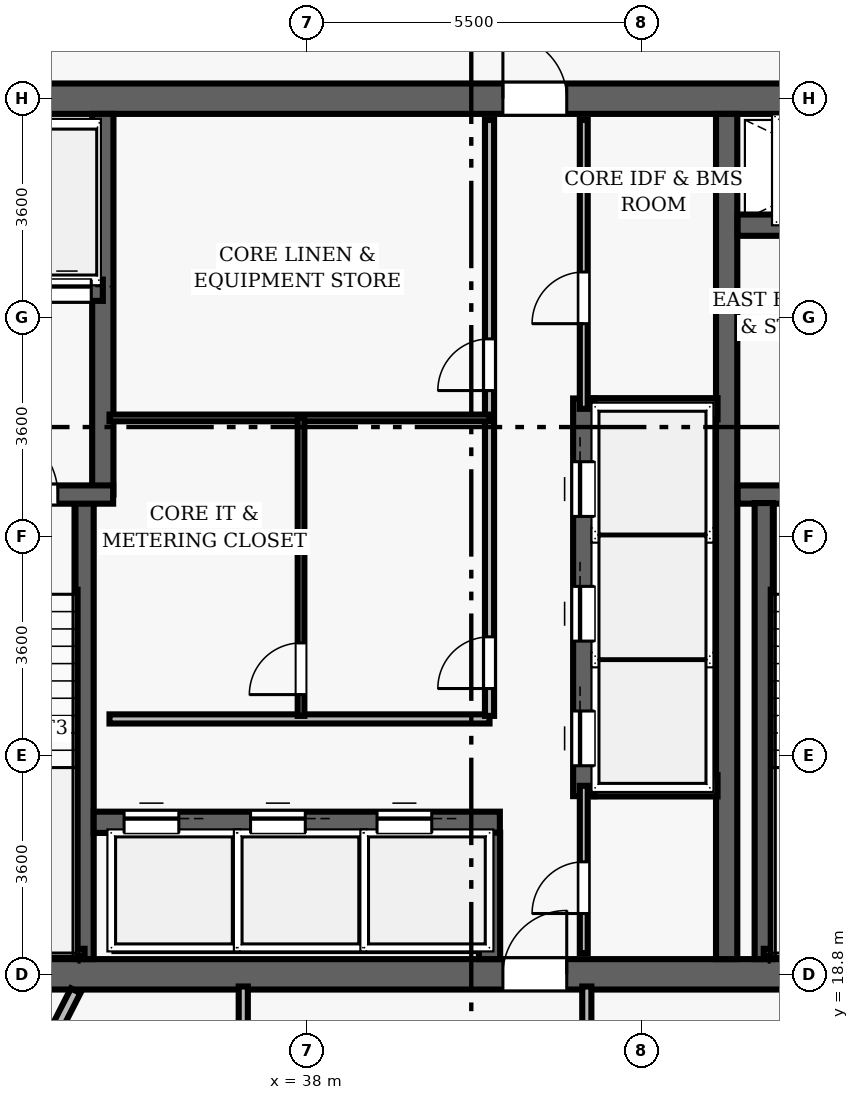
"""IFC4 building model, lengths in metres.
Left out: names, types, materials, properties, quantities, classifications, styles, units other than length and angle.
Written with IfcOpenShell. Run it as: python <this file> out.ifc"""

import sys

from ifc_helpers import new_model, si_unit, direction, frame, frame_2d, origin, place, context, subcontext, project, spatial, rectangle, extrude, element, fill, save


model = new_model("IFC4")
c1 = context("Model", 3, precision=1e-05, world=origin(), true_north=direction((0.0, 1.0)))
c2 = subcontext(c1, "Body", "Model", "MODEL_VIEW")
j1 = project(units=[si_unit("LENGTHUNIT", "METRE"), si_unit("PLANEANGLEUNIT", "RADIAN")], contexts=[c1])
p1 = place(None, origin())
s1 = spatial("IfcSite", under=j1, at=p1, CompositionType="ELEMENT")
p2 = place(p1, origin())
s2 = spatial("IfcBuilding", under=s1, at=p2, CompositionType="ELEMENT")
p3 = place(p2, frame((0.0, 0.0, 171.2)))
s3 = spatial("IfcBuildingStorey", under=s2, at=p3, CompositionType="ELEMENT", Elevation=171.2)
p4 = place(p3, frame((26.75, 18.8, 0.0), z_axis=(0.0, 0.0, 1.0), x_axis=(1.0, 0.0, 0.0)))
e1 = element("IfcWall", 1, at=p4, inside=s3, PredefinedType="SHEAR", context=c2, shape_type="SweptSolid", body=[
    extrude(rectangle(XDim=22.5, YDim=0.5, at=frame_2d((11.25, 0.0))), origin(), (0.0, 0.0, 1.0), 3.85),
])
p5 = place(p4, frame((14.47, 0.0, 0.0)))
e2 = element("IfcOpeningElement", 2, at=p5, cuts=e1, PredefinedType="OPENING", context=c2, shape_type="SweptSolid", body=[
    extrude(rectangle(XDim=1.05, YDim=2.15, at=frame_2d((0.525, 1.075))), frame((0.0, 0.26, 0.0), z_axis=(0.0, -1.0, 0.0), x_axis=(1.0, 0.0, 0.0)), (0.0, 0.0, 1.0), 0.52),
])
p6 = place(p3, frame((26.75, 33.2, 0.0), z_axis=(0.0, 0.0, 1.0), x_axis=(1.0, 0.0, 0.0)))
e3 = element("IfcWall", 3, at=p6, inside=s3, PredefinedType="SHEAR", context=c2, shape_type="SweptSolid", body=[
    extrude(rectangle(XDim=22.5, YDim=0.5, at=frame_2d((11.25, 0.0))), origin(), (0.0, 0.0, 1.0), 3.85),
])
p7 = place(p6, frame((4.57, 0.0, 0.0)))
e4 = element("IfcOpeningElement", 4, at=p7, cuts=e3, PredefinedType="OPENING", context=c2, shape_type="SweptSolid", body=[
    extrude(rectangle(XDim=1.05, YDim=2.15, at=frame_2d((0.525, 1.075))), frame((0.0, 0.26, 0.0), z_axis=(0.0, -1.0, 0.0), x_axis=(1.0, 0.0, 0.0)), (0.0, 0.0, 1.0), 0.52),
])
p8 = place(p6, frame((14.47, 0.0, 0.0)))
e5 = element("IfcOpeningElement", 5, at=p8, cuts=e3, PredefinedType="OPENING", context=c2, shape_type="SweptSolid", body=[
    extrude(rectangle(XDim=1.05, YDim=2.15, at=frame_2d((0.525, 1.075))), frame((0.0, 0.26, 0.0), z_axis=(0.0, -1.0, 0.0), x_axis=(1.0, 0.0, 0.0)), (0.0, 0.0, 1.0), 0.52),
])
p9 = place(p3, frame((44.9, 19.05, 0.0), z_axis=(0.0, 0.0, 1.0), x_axis=(0.0, 1.0, 0.0)))
e6 = element("IfcWall", 6, at=p9, inside=s3, PredefinedType="SHEAR", context=c2, shape_type="SweptSolid", body=[
    extrude(rectangle(XDim=13.9, YDim=0.35, at=frame_2d((6.95, 0.0))), origin(), (0.0, 0.0, 1.0), 3.85),
])
p10 = place(p3, frame((45.08, 26.69, 0.0), z_axis=(0.0, 0.0, 1.0), x_axis=(1.0, 0.0, 0.0)))
e7 = element("IfcWall", 7, at=p10, inside=s3, PredefinedType="SHEAR", context=c2, shape_type="SweptSolid", body=[
    extrude(rectangle(XDim=3.67, YDim=0.3, at=frame_2d((1.835, 0.0))), origin(), (0.0, 0.0, 1.0), 3.85),
])
p11 = place(p10, frame((1.05, 0.0, 0.0)))
e8 = element("IfcOpeningElement", 8, at=p11, cuts=e7, PredefinedType="OPENING", context=c2, shape_type="SweptSolid", body=[
    extrude(rectangle(XDim=1.1, YDim=2.15, at=frame_2d((0.55, 1.075))), frame((0.0, 0.16, 0.0), z_axis=(0.0, -1.0, 0.0), x_axis=(1.0, 0.0, 0.0)), (0.0, 0.0, 1.0), 0.32),
])
p12 = place(p3, frame((45.51, 19.05, 0.0), z_axis=(0.0, 0.0, 1.0), x_axis=(0.0, 1.0, 0.0)))
e9 = element("IfcWall", 9, at=p12, inside=s3, PredefinedType="SHEAR", context=c2, shape_type="SweptSolid", body=[
    extrude(rectangle(XDim=7.5, YDim=0.3, at=frame_2d((3.75, 0.0))), origin(), (0.0, 0.0, 1.0), 3.85),
])
p13 = place(p3, frame((45.51, 19.16, 0.0), z_axis=(0.0, 0.0, 1.0), x_axis=(1.0, 0.0, 0.0)))
e10 = element("IfcWall", 10, at=p13, inside=s3, PredefinedType="SHEAR", context=c2, shape_type="SweptSolid", body=[
    extrude(rectangle(XDim=3.095, YDim=0.12, at=frame_2d((1.547, 0.0))), origin(), (0.0, 0.0, 1.0), 3.85),
])
p14 = place(p3, frame((45.08, 31.12, 0.0), z_axis=(0.0, 0.0, 1.0), x_axis=(1.0, 0.0, 0.0)))
e11 = element("IfcWall", 11, at=p14, inside=s3, PredefinedType="SHEAR", context=c2, shape_type="SweptSolid", body=[
    extrude(rectangle(XDim=3.67, YDim=0.35, at=frame_2d((1.835, 0.0))), origin(), (0.0, 0.0, 1.0), 3.035),
])
p15 = place(p14, frame((1.25, 0.0, 0.0)))
e12 = element("IfcOpeningElement", 12, at=p15, cuts=e11, PredefinedType="OPENING", context=c2, shape_type="SweptSolid", body=[
    extrude(rectangle(XDim=1.1, YDim=2.15, at=frame_2d((0.55, 1.075))), frame((0.0, 0.185, 0.0), z_axis=(0.0, -1.0, 0.0), x_axis=(1.0, 0.0, 0.0)), (0.0, 0.0, 1.0), 0.37),
])
p16 = place(p3, frame((34.34, 19.05, 0.0), z_axis=(0.0, 0.0, 1.0), x_axis=(0.0, 1.0, 0.0)))
e13 = element("IfcWall", 13, at=p16, inside=s3, PredefinedType="SHEAR", context=c2, shape_type="SweptSolid", body=[
    extrude(rectangle(XDim=7.5, YDim=0.3, at=frame_2d((3.75, 0.0))), origin(), (0.0, 0.0, 1.0), 3.85),
])
p17 = place(p3, frame((34.64, 26.69, 0.0), z_axis=(0.0, 0.0, 1.0), x_axis=(0.0, 1.0, 0.0)))
e14 = element("IfcWall", 14, at=p17, inside=s3, PredefinedType="SHEAR", context=c2, shape_type="SweptSolid", body=[
    extrude(rectangle(XDim=6.26, YDim=0.35, at=frame_2d((3.13, 0.0))), origin(), (0.0, 0.0, 1.0), 3.85),
])
p18 = place(p3, frame((31.25, 26.69, 0.0), z_axis=(0.0, 0.0, 1.0), x_axis=(1.0, 0.0, 0.0)))
e15 = element("IfcWall", 15, at=p18, inside=s3, PredefinedType="SHEAR", context=c2, shape_type="SweptSolid", body=[
    extrude(rectangle(XDim=3.56, YDim=0.3, at=frame_2d((1.78, 0.0))), origin(), (0.0, 0.0, 1.0), 3.85),
])
p19 = place(p18, frame((1.55, 0.0, 0.0)))
e16 = element("IfcOpeningElement", 16, at=p19, cuts=e15, PredefinedType="OPENING", context=c2, shape_type="SweptSolid", body=[
    extrude(rectangle(XDim=1.1, YDim=2.15, at=frame_2d((0.55, 1.075))), frame((0.0, 0.16, 0.0), z_axis=(0.0, -1.0, 0.0), x_axis=(1.0, 0.0, 0.0)), (0.0, 0.0, 1.0), 0.32),
])
p20 = place(p3, frame((31.3, 19.16, 0.0), z_axis=(0.0, 0.0, 1.0), x_axis=(1.0, 0.0, 0.0)))
e17 = element("IfcWall", 17, at=p20, inside=s3, PredefinedType="SHEAR", context=c2, shape_type="SweptSolid", body=[
    extrude(rectangle(XDim=3.04, YDim=0.12, at=frame_2d((1.52, 0.0))), origin(), (0.0, 0.0, 1.0), 3.85),
])
p21 = place(p3, frame((32.23, 30.05, 0.0), z_axis=(0.0, 0.0, 1.0), x_axis=(1.0, 0.0, 0.0)))
e18 = element("IfcWall", 18, at=p21, inside=s3, PredefinedType="SHEAR", context=c2, shape_type="SweptSolid", body=[
    extrude(rectangle(XDim=2.41, YDim=0.35, at=frame_2d((1.205, 0.0))), origin(), (0.0, 0.0, 1.0), 3.035),
])
p22 = place(p21, frame((0.42, 0.0, 0.0)))
e19 = element("IfcOpeningElement", 19, at=p22, cuts=e18, PredefinedType="OPENING", context=c2, shape_type="SweptSolid", body=[
    extrude(rectangle(XDim=0.8, YDim=2.15, at=frame_2d((0.4, 1.075))), frame((0.0, 0.185, 0.0), z_axis=(0.0, -1.0, 0.0), x_axis=(1.0, 0.0, 0.0)), (0.0, 0.0, 1.0), 0.37),
])
p23 = place(p21, frame((1.42, 0.0, 0.0)))
e20 = element("IfcOpeningElement", 20, at=p23, cuts=e18, PredefinedType="OPENING", context=c2, shape_type="SweptSolid", body=[
    extrude(rectangle(XDim=0.8, YDim=2.15, at=frame_2d((0.4, 1.075))), frame((0.0, 0.185, 0.0), z_axis=(0.0, -1.0, 0.0), x_axis=(1.0, 0.0, 0.0)), (0.0, 0.0, 1.0), 0.37),
])
p24 = place(p3, frame((42.55, 21.73, 0.0), z_axis=(0.0, 0.0, 1.0), x_axis=(0.0, 1.0, 0.0)))
e21 = element("IfcWall", 21, at=p24, inside=s3, PredefinedType="SHEAR", context=c2, shape_type="SweptSolid", body=[
    extrude(rectangle(XDim=6.54, YDim=0.35, at=frame_2d((3.27, 0.0))), origin(), (0.0, 0.0, 1.0), 3.035),
])
p25 = place(p24, frame((0.5, 0.0, 0.0)))
e22 = element("IfcOpeningElement", 22, at=p25, cuts=e21, PredefinedType="OPENING", context=c2, shape_type="SweptSolid", body=[
    extrude(rectangle(XDim=0.9, YDim=2.15, at=frame_2d((0.45, 1.075))), frame((0.0, 0.185, 0.0), z_axis=(0.0, -1.0, 0.0), x_axis=(1.0, 0.0, 0.0)), (0.0, 0.0, 1.0), 0.37),
])
p26 = place(p24, frame((2.55, 0.0, 0.0)))
e23 = element("IfcOpeningElement", 23, at=p26, cuts=e21, PredefinedType="OPENING", context=c2, shape_type="SweptSolid", body=[
    extrude(rectangle(XDim=0.9, YDim=2.15, at=frame_2d((0.45, 1.075))), frame((0.0, 0.185, 0.0), z_axis=(0.0, -1.0, 0.0), x_axis=(1.0, 0.0, 0.0)), (0.0, 0.0, 1.0), 0.37),
])
p27 = place(p24, frame((4.6, 0.0, 0.0)))
e24 = element("IfcOpeningElement", 24, at=p27, cuts=e21, PredefinedType="OPENING", context=c2, shape_type="SweptSolid", body=[
    extrude(rectangle(XDim=0.9, YDim=2.15, at=frame_2d((0.45, 1.075))), frame((0.0, 0.185, 0.0), z_axis=(0.0, -1.0, 0.0), x_axis=(1.0, 0.0, 0.0)), (0.0, 0.0, 1.0), 0.37),
])
for number, where, z_axis, x_axis in (
    (25, (42.72, 21.9, 0.0), (0.0, 0.0, 1.0), (1.0, 0.0, 0.0)),
    (26, (42.72, 28.1, 0.0), (0.0, 0.0, 1.0), (1.0, 0.0, 0.0)),
):
    element("IfcWall", number, at=place(p3, frame(where, z_axis=z_axis, x_axis=x_axis)), inside=s3, PredefinedType="SHEAR", context=c2, shape_type="SweptSolid", body=[
        extrude(rectangle(XDim=2.03, YDim=0.35, at=frame_2d((1.015, 0.0))), origin(), (0.0, 0.0, 1.0), 3.035),
    ])
p28 = place(p3, frame((34.49, 21.3, 0.0), z_axis=(0.0, 0.0, 1.0), x_axis=(1.0, 0.0, 0.0)))
e27 = element("IfcWall", 27, at=p28, inside=s3, PredefinedType="SHEAR", context=c2, shape_type="SweptSolid", body=[
    extrude(rectangle(XDim=6.68, YDim=0.35, at=frame_2d((3.34, 0.0))), origin(), (0.0, 0.0, 1.0), 3.035),
])
p29 = place(p28, frame((0.5, 0.0, 0.0)))
e28 = element("IfcOpeningElement", 28, at=p29, cuts=e27, PredefinedType="OPENING", context=c2, shape_type="SweptSolid", body=[
    extrude(rectangle(XDim=0.9, YDim=2.15, at=frame_2d((0.45, 1.075))), frame((0.0, 0.185, 0.0), z_axis=(0.0, -1.0, 0.0), x_axis=(1.0, 0.0, 0.0)), (0.0, 0.0, 1.0), 0.37),
])
p30 = place(p28, frame((2.58, 0.0, 0.0)))
e29 = element("IfcOpeningElement", 29, at=p30, cuts=e27, PredefinedType="OPENING", context=c2, shape_type="SweptSolid", body=[
    extrude(rectangle(XDim=0.9, YDim=2.15, at=frame_2d((0.45, 1.075))), frame((0.0, 0.185, 0.0), z_axis=(0.0, -1.0, 0.0), x_axis=(1.0, 0.0, 0.0)), (0.0, 0.0, 1.0), 0.37),
])
p31 = place(p28, frame((4.66, 0.0, 0.0)))
e30 = element("IfcOpeningElement", 30, at=p31, cuts=e27, PredefinedType="OPENING", context=c2, shape_type="SweptSolid", body=[
    extrude(rectangle(XDim=0.9, YDim=2.15, at=frame_2d((0.45, 1.075))), frame((0.0, 0.185, 0.0), z_axis=(0.0, -1.0, 0.0), x_axis=(1.0, 0.0, 0.0)), (0.0, 0.0, 1.0), 0.37),
])
p32 = place(p3, frame((41.0, 19.05, 0.0), z_axis=(0.0, 0.0, 1.0), x_axis=(0.0, 1.0, 0.0)))
e31 = element("IfcWall", 31, at=p32, inside=s3, PredefinedType="SHEAR", context=c2, shape_type="SweptSolid", body=[
    extrude(rectangle(XDim=2.08, YDim=0.35, at=frame_2d((1.04, 0.0))), origin(), (0.0, 0.0, 1.0), 3.035),
])
p33 = place(p3, frame((34.75, 23.0, 0.0), z_axis=(0.0, 0.0, 1.0), x_axis=(1.0, 0.0, 0.0)))
e32 = element("IfcWall", 32, at=p33, inside=s3, PredefinedType="PARTITIONING", context=c2, shape_type="SweptSolid", body=[
    extrude(rectangle(XDim=6.25, YDim=0.15, at=frame_2d((3.125, 0.0))), origin(), (0.0, 0.0, 1.0), 3.035),
])
p34 = place(p3, frame((41.0, 23.05, 0.0), z_axis=(0.0, 0.0, 1.0), x_axis=(0.0, 1.0, 0.0)))
e33 = element("IfcWall", 33, at=p34, inside=s3, PredefinedType="PARTITIONING", context=c2, shape_type="SweptSolid", body=[
    extrude(rectangle(XDim=9.8, YDim=0.15, at=frame_2d((4.9, 0.0))), origin(), (0.0, 0.0, 1.0), 3.035),
])
p35 = place(p34, frame((5.35, 0.0, 0.0)))
e34 = element("IfcOpeningElement", 34, at=p35, cuts=e33, PredefinedType="OPENING", context=c2, shape_type="SweptSolid", body=[
    extrude(rectangle(XDim=0.85, YDim=2.1, at=frame_2d((0.425, 1.05))), frame((0.0, 0.085, 0.0), z_axis=(0.0, -1.0, 0.0), x_axis=(1.0, 0.0, 0.0)), (0.0, 0.0, 1.0), 0.17),
])
p36 = place(p34, frame((0.45, 0.0, 0.0)))
e35 = element("IfcOpeningElement", 35, at=p36, cuts=e33, PredefinedType="OPENING", context=c2, shape_type="SweptSolid", body=[
    extrude(rectangle(XDim=0.85, YDim=2.1, at=frame_2d((0.425, 1.05))), frame((0.0, 0.085, 0.0), z_axis=(0.0, -1.0, 0.0), x_axis=(1.0, 0.0, 0.0)), (0.0, 0.0, 1.0), 0.17),
])
p37 = place(p3, frame((34.75, 27.95, 0.0), z_axis=(0.0, 0.0, 1.0), x_axis=(1.0, 0.0, 0.0)))
e36 = element("IfcWall", 36, at=p37, inside=s3, PredefinedType="PARTITIONING", context=c2, shape_type="SweptSolid", body=[
    extrude(rectangle(XDim=6.25, YDim=0.11, at=frame_2d((3.125, 0.0))), origin(), (0.0, 0.0, 1.0), 3.035),
])
p38 = place(p3, frame((37.9, 23.05, 0.0), z_axis=(0.0, 0.0, 1.0), x_axis=(0.0, 1.0, 0.0)))
e37 = element("IfcWall", 37, at=p38, inside=s3, PredefinedType="PARTITIONING", context=c2, shape_type="SweptSolid", body=[
    extrude(rectangle(XDim=4.9, YDim=0.11, at=frame_2d((2.45, 0.0))), origin(), (0.0, 0.0, 1.0), 3.035),
])
p39 = place(p38, frame((0.35, 0.0, 0.0)))
e38 = element("IfcOpeningElement", 38, at=p39, cuts=e37, PredefinedType="OPENING", context=c2, shape_type="SweptSolid", body=[
    extrude(rectangle(XDim=0.85, YDim=2.1, at=frame_2d((0.425, 1.05))), frame((0.0, 0.065, 0.0), z_axis=(0.0, -1.0, 0.0), x_axis=(1.0, 0.0, 0.0)), (0.0, 0.0, 1.0), 0.13),
])
p40 = place(p3, frame((42.55, 28.1, 0.0), z_axis=(0.0, 0.0, 1.0), x_axis=(0.0, 1.0, 0.0)))
e39 = element("IfcWall", 39, at=p40, inside=s3, PredefinedType="PARTITIONING", context=c2, shape_type="SweptSolid", body=[
    extrude(rectangle(XDim=4.75, YDim=0.13, at=frame_2d((2.375, 0.0))), origin(), (0.0, 0.0, 1.0), 3.035),
])
p41 = place(p40, frame((1.4, 0.0, 0.0)))
e40 = element("IfcOpeningElement", 40, at=p41, cuts=e39, PredefinedType="OPENING", context=c2, shape_type="SweptSolid", body=[
    extrude(rectangle(XDim=0.85, YDim=2.1, at=frame_2d((0.425, 1.05))), frame((0.0, 0.075, 0.0), z_axis=(0.0, -1.0, 0.0), x_axis=(1.0, 0.0, 0.0)), (0.0, 0.0, 1.0), 0.15),
])
p42 = place(p3, frame((42.55, 19.15, 0.0), z_axis=(0.0, 0.0, 1.0), x_axis=(0.0, 1.0, 0.0)))
e41 = element("IfcWall", 41, at=p42, inside=s3, PredefinedType="PARTITIONING", context=c2, shape_type="SweptSolid", body=[
    extrude(rectangle(XDim=2.75, YDim=0.13, at=frame_2d((1.375, 0.0))), origin(), (0.0, 0.0, 1.0), 3.035),
])
p43 = place(p42, frame((0.65, 0.0, 0.0)))
e42 = element("IfcOpeningElement", 42, at=p43, cuts=e41, PredefinedType="OPENING", context=c2, shape_type="SweptSolid", body=[
    extrude(rectangle(XDim=0.85, YDim=2.1, at=frame_2d((0.425, 1.05))), frame((0.0, 0.075, 0.0), z_axis=(0.0, -1.0, 0.0), x_axis=(1.0, 0.0, 0.0)), (0.0, 0.0, 1.0), 0.15),
])
p44 = place(p3, frame((36.95, 11.2, 0.0), z_axis=(0.0, 0.0, 1.0), x_axis=(0.0, 1.0, 0.0)))
e43 = element("IfcWall", 43, at=p44, inside=s3, PredefinedType="PARTITIONING", context=c2, shape_type="SweptSolid", body=[
    extrude(rectangle(XDim=7.4, YDim=0.15, at=frame_2d((3.7, 0.0))), origin(), (0.0, 0.0, 1.0), 3.035),
])
p45 = place(p44, frame((5.075, 0.0, 0.0)))
e44 = element("IfcOpeningElement", 44, at=p45, cuts=e43, PredefinedType="OPENING", context=c2, shape_type="SweptSolid", body=[
    extrude(rectangle(XDim=0.95, YDim=2.15, at=frame_2d((0.475, 1.075))), frame((0.0, 0.085, 0.0), z_axis=(0.0, -1.0, 0.0), x_axis=(1.0, 0.0, 0.0)), (0.0, 0.0, 1.0), 0.17),
])
p46 = place(p3, frame((42.6, 16.65, 0.0), z_axis=(0.0, 0.0, 1.0), x_axis=(0.0, 1.0, 0.0)))
e45 = element("IfcWall", 45, at=p46, inside=s3, PredefinedType="PARTITIONING", context=c2, shape_type="SweptSolid", body=[
    extrude(rectangle(XDim=1.95, YDim=0.15, at=frame_2d((0.975, 0.0))), origin(), (0.0, 0.0, 1.0), 3.035),
])
p47 = place(p3, frame((34.194, 18.53, 0.0), z_axis=(0.0, 0.0, 1.0), x_axis=(-0.453989957323, -0.891006800563, 0.0)))
e46 = element("IfcWall", 46, at=p47, inside=s3, PredefinedType="PARTITIONING", context=c2, shape_type="SweptSolid", body=[
    extrude(rectangle(XDim=13.449, YDim=0.175, at=frame_2d((6.725, 0.0))), origin(), (0.0, 0.0, 1.0), 3.035),
])
p48 = place(p19, origin())
e47 = element("IfcDoor", 47, at=p48, inside=s3, OperationType="SINGLE_SWING_LEFT", PredefinedType="DOOR", context=c2, shape_type="SweptSolid", body=[
    extrude(rectangle(XDim=1.1, YDim=2.15, at=frame_2d((0.55, 1.075))), frame((0.0, 0.025, 0.0), z_axis=(0.0, -1.0, 0.0), x_axis=(1.0, 0.0, 0.0)), (0.0, 0.0, 1.0), 0.05),
])
fill(e16, e47)
p49 = place(p8, origin())
e48 = element("IfcDoor", 48, at=p49, inside=s3, OperationType="SINGLE_SWING_LEFT", PredefinedType="DOOR", context=c2, shape_type="SweptSolid", body=[
    extrude(rectangle(XDim=1.05, YDim=2.15, at=frame_2d((0.525, 1.075))), frame((0.0, 0.025, 0.0), z_axis=(0.0, -1.0, 0.0), x_axis=(1.0, 0.0, 0.0)), (0.0, 0.0, 1.0), 0.05),
])
fill(e5, e48)
p50 = place(p5, origin())
e49 = element("IfcDoor", 49, at=p50, inside=s3, OperationType="SINGLE_SWING_RIGHT", PredefinedType="DOOR", context=c2, shape_type="SweptSolid", body=[
    extrude(rectangle(XDim=1.05, YDim=2.15, at=frame_2d((0.525, 1.075))), frame((0.0, 0.025, 0.0), z_axis=(0.0, -1.0, 0.0), x_axis=(1.0, 0.0, 0.0)), (0.0, 0.0, 1.0), 0.05),
])
fill(e2, e49)
p51 = place(p35, origin())
e50 = element("IfcDoor", 50, at=p51, inside=s3, OperationType="SINGLE_SWING_LEFT", PredefinedType="DOOR", context=c2, shape_type="SweptSolid", body=[
    extrude(rectangle(XDim=0.85, YDim=2.1, at=frame_2d((0.425, 1.05))), frame((0.0, 0.025, 0.0), z_axis=(0.0, -1.0, 0.0), x_axis=(1.0, 0.0, 0.0)), (0.0, 0.0, 1.0), 0.05),
])
fill(e34, e50)
p52 = place(p36, origin())
e51 = element("IfcDoor", 51, at=p52, inside=s3, OperationType="SINGLE_SWING_LEFT", PredefinedType="DOOR", context=c2, shape_type="SweptSolid", body=[
    extrude(rectangle(XDim=0.85, YDim=2.1, at=frame_2d((0.425, 1.05))), frame((0.0, 0.025, 0.0), z_axis=(0.0, -1.0, 0.0), x_axis=(1.0, 0.0, 0.0)), (0.0, 0.0, 1.0), 0.05),
])
fill(e35, e51)
p53 = place(p39, origin())
e52 = element("IfcDoor", 52, at=p53, inside=s3, OperationType="SINGLE_SWING_LEFT", PredefinedType="DOOR", context=c2, shape_type="SweptSolid", body=[
    extrude(rectangle(XDim=0.85, YDim=2.1, at=frame_2d((0.425, 1.05))), frame((0.0, 0.025, 0.0), z_axis=(0.0, -1.0, 0.0), x_axis=(1.0, 0.0, 0.0)), (0.0, 0.0, 1.0), 0.05),
])
fill(e38, e52)
p54 = place(p41, origin())
e53 = element("IfcDoor", 53, at=p54, inside=s3, OperationType="SINGLE_SWING_LEFT", PredefinedType="DOOR", context=c2, shape_type="SweptSolid", body=[
    extrude(rectangle(XDim=0.85, YDim=2.1, at=frame_2d((0.425, 1.05))), frame((0.0, 0.025, 0.0), z_axis=(0.0, -1.0, 0.0), x_axis=(1.0, 0.0, 0.0)), (0.0, 0.0, 1.0), 0.05),
])
fill(e40, e53)
p55 = place(p43, origin())
e54 = element("IfcDoor", 54, at=p55, inside=s3, OperationType="SINGLE_SWING_LEFT", PredefinedType="DOOR", context=c2, shape_type="SweptSolid", body=[
    extrude(rectangle(XDim=0.85, YDim=2.1, at=frame_2d((0.425, 1.05))), frame((0.0, 0.025, 0.0), z_axis=(0.0, -1.0, 0.0), x_axis=(1.0, 0.0, 0.0)), (0.0, 0.0, 1.0), 0.05),
])
fill(e42, e54)
p56 = place(p29, origin())
e55 = element("IfcDoor", 55, at=p56, inside=s3, OperationType="SLIDING_TO_LEFT", PredefinedType="DOOR", context=c2, shape_type="SweptSolid", body=[
    extrude(rectangle(XDim=0.9, YDim=2.15, at=frame_2d((0.45, 1.075))), frame((0.0, 0.025, 0.0), z_axis=(0.0, -1.0, 0.0), x_axis=(1.0, 0.0, 0.0)), (0.0, 0.0, 1.0), 0.05),
])
fill(e28, e55)
p57 = place(p30, origin())
e56 = element("IfcDoor", 56, at=p57, inside=s3, OperationType="SLIDING_TO_LEFT", PredefinedType="DOOR", context=c2, shape_type="SweptSolid", body=[
    extrude(rectangle(XDim=0.9, YDim=2.15, at=frame_2d((0.45, 1.075))), frame((0.0, 0.025, 0.0), z_axis=(0.0, -1.0, 0.0), x_axis=(1.0, 0.0, 0.0)), (0.0, 0.0, 1.0), 0.05),
])
fill(e29, e56)
p58 = place(p31, origin())
e57 = element("IfcDoor", 57, at=p58, inside=s3, OperationType="SLIDING_TO_LEFT", PredefinedType="DOOR", context=c2, shape_type="SweptSolid", body=[
    extrude(rectangle(XDim=0.9, YDim=2.15, at=frame_2d((0.45, 1.075))), frame((0.0, 0.025, 0.0), z_axis=(0.0, -1.0, 0.0), x_axis=(1.0, 0.0, 0.0)), (0.0, 0.0, 1.0), 0.05),
])
fill(e30, e57)
p59 = place(p25, origin())
e58 = element("IfcDoor", 58, at=p59, inside=s3, OperationType="SLIDING_TO_LEFT", PredefinedType="DOOR", context=c2, shape_type="SweptSolid", body=[
    extrude(rectangle(XDim=0.9, YDim=2.15, at=frame_2d((0.45, 1.075))), frame((0.0, 0.025, 0.0), z_axis=(0.0, -1.0, 0.0), x_axis=(1.0, 0.0, 0.0)), (0.0, 0.0, 1.0), 0.05),
])
fill(e22, e58)
p60 = place(p26, origin())
e59 = element("IfcDoor", 59, at=p60, inside=s3, OperationType="SLIDING_TO_LEFT", PredefinedType="DOOR", context=c2, shape_type="SweptSolid", body=[
    extrude(rectangle(XDim=0.9, YDim=2.15, at=frame_2d((0.45, 1.075))), frame((0.0, 0.025, 0.0), z_axis=(0.0, -1.0, 0.0), x_axis=(1.0, 0.0, 0.0)), (0.0, 0.0, 1.0), 0.05),
])
fill(e23, e59)
p61 = place(p27, origin())
e60 = element("IfcDoor", 60, at=p61, inside=s3, OperationType="SLIDING_TO_LEFT", PredefinedType="DOOR", context=c2, shape_type="SweptSolid", body=[
    extrude(rectangle(XDim=0.9, YDim=2.15, at=frame_2d((0.45, 1.075))), frame((0.0, 0.025, 0.0), z_axis=(0.0, -1.0, 0.0), x_axis=(1.0, 0.0, 0.0)), (0.0, 0.0, 1.0), 0.05),
])
fill(e24, e60)
p62 = place(p23, origin())
e61 = element("IfcDoor", 61, at=p62, inside=s3, OperationType="SLIDING_TO_LEFT", PredefinedType="DOOR", context=c2, shape_type="SweptSolid", body=[
    extrude(rectangle(XDim=0.8, YDim=2.15, at=frame_2d((0.4, 1.075))), frame((0.0, 0.025, 0.0), z_axis=(0.0, -1.0, 0.0), x_axis=(1.0, 0.0, 0.0)), (0.0, 0.0, 1.0), 0.05),
])
fill(e20, e61)
save(model, sys.argv[1])
